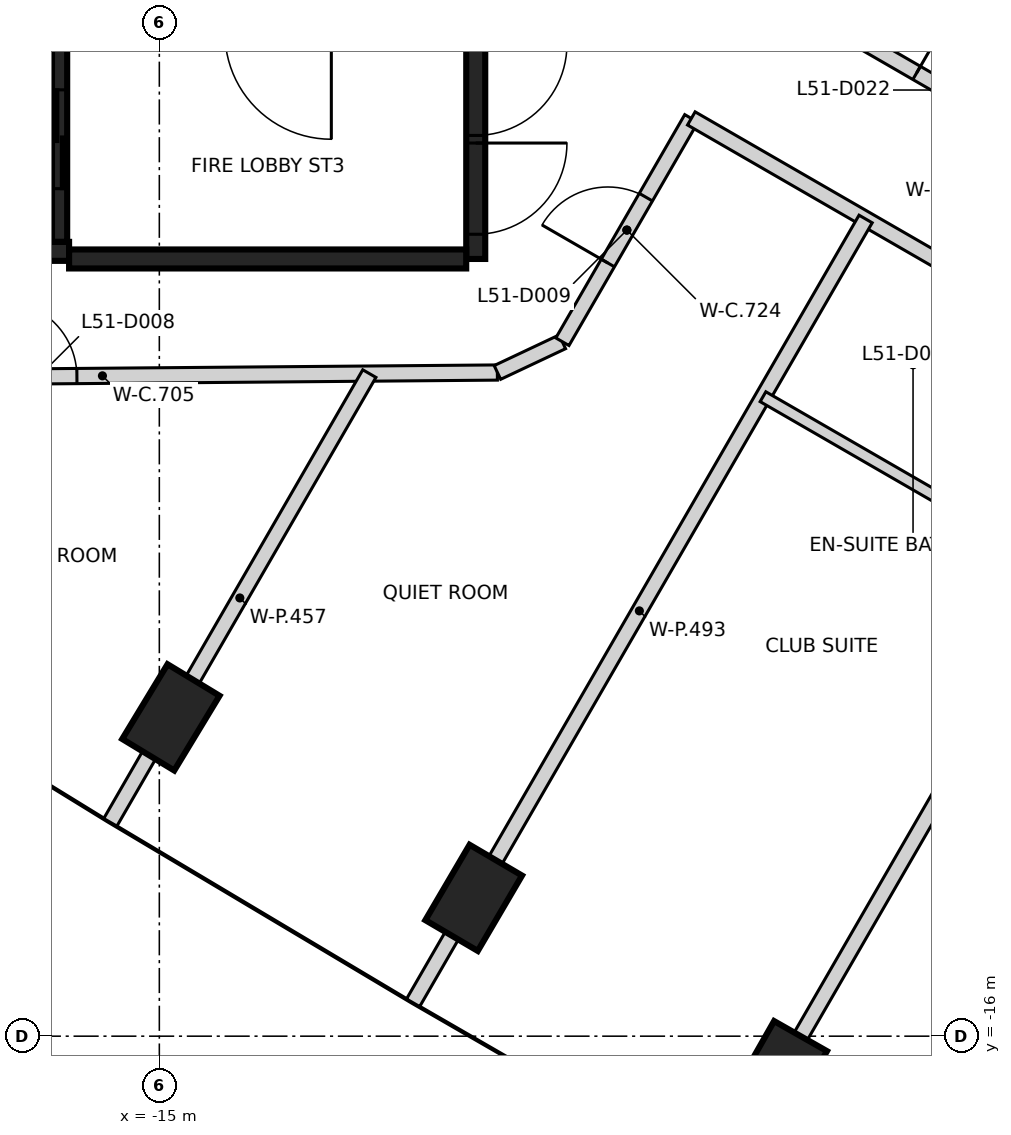
"""IFC4 building model, lengths in metres.
Left out: names, types, materials, properties, quantities, classifications, styles, units other than length and angle.
Written with IfcOpenShell. Run it as: python <this file> out.ifc"""

import sys

from ifc_helpers import new_model, si_unit, direction, frame, frame_2d, origin, origin_2d, place, context, subcontext, project, spatial, rectangle, extrude, element, fill, save


model = new_model("IFC4")
c1 = context("Model", 3, precision=1e-05, world=origin(), true_north=direction((0.0, 1.0)))
c2 = subcontext(c1, "Body", "Model", "MODEL_VIEW")
j1 = project(units=[si_unit("LENGTHUNIT", "METRE"), si_unit("PLANEANGLEUNIT", "RADIAN")], contexts=[c1])
p1 = place(None, origin())
s1 = spatial("IfcSite", under=j1, at=p1, CompositionType="ELEMENT")
p2 = place(p1, origin())
s2 = spatial("IfcBuilding", under=s1, at=p2, CompositionType="ELEMENT")
p3 = place(p2, frame((0.0, 0.0, 204.4)))
s3 = spatial("IfcBuildingStorey", under=s2, at=p3, CompositionType="ELEMENT", Elevation=204.4)
for number, where, z_axis, x_axis in (
    (1, (-14.848, -11.806, -0.35), (0.0, 0.0, 1.0), (0.518, 0.855, 0.0)),
    (2, (-10.864, -14.18, -0.35), (0.0, 0.0, 1.0), (0.506, 0.862, 0.0)),
    (3, (-6.848, -16.499, -0.35), (0.0, 0.0, 1.0), (0.494, 0.87, 0.0)),
):
    element("IfcColumn", number, at=place(p3, frame(where, z_axis=z_axis, x_axis=x_axis)), inside=s3, PredefinedType="COLUMN", context=c2, shape_type="SweptSolid", body=[
        extrude(rectangle(XDim=1.15, YDim=0.8, at=origin_2d()), origin(), (0.0, 0.0, 1.0), 3.6),
    ])
p4 = place(p3, frame((-10.837, 5.775, 0.0), z_axis=(0.0, 0.0, 1.0), x_axis=(0.0, -1.0, 0.0)))
e4 = element("IfcWall", 4, at=p4, inside=s3, PredefinedType="SHEAR", context=c2, shape_type="SweptSolid", body=[
    extrude(rectangle(XDim=11.55, YDim=0.25, at=frame_2d((5.775, 0.0))), origin(), (0.0, 0.0, 1.0), 3.25),
])
p5 = place(p4, frame((10.025, 0.0, 0.0)))
e5 = element("IfcOpeningElement", 5, at=p5, cuts=e4, PredefinedType="OPENING", context=c2, shape_type="SweptSolid", body=[
    extrude(rectangle(XDim=1.2, YDim=2.1, at=frame_2d((0.6, 1.05))), frame((0.0, 0.135, 0.0), z_axis=(0.0, -1.0, 0.0), x_axis=(1.0, 0.0, 0.0)), (0.0, 0.0, 1.0), 0.27),
])
p6 = place(p4, frame((8.725, 0.0, 0.0)))
e6 = element("IfcOpeningElement", 6, at=p6, cuts=e4, PredefinedType="OPENING", context=c2, shape_type="SweptSolid", body=[
    extrude(rectangle(XDim=1.2, YDim=2.1, at=frame_2d((0.6, 1.05))), frame((0.0, 0.135, 0.0), z_axis=(0.0, -1.0, 0.0), x_axis=(1.0, 0.0, 0.0)), (0.0, 0.0, 1.0), 0.27),
])
p7 = place(p3, frame((-16.187, -5.675, 0.0), z_axis=(0.0, 0.0, 1.0), x_axis=(-1.0, 0.0, 0.0)))
e7 = element("IfcWall", 7, at=p7, inside=s3, PredefinedType="SHEAR", context=c2, shape_type="SweptSolid", body=[
    extrude(rectangle(XDim=6.125, YDim=0.25, at=frame_2d((3.062, 0.0))), origin(), (0.0, 0.0, 1.0), 3.25),
])
p8 = place(p7, frame((3.563, 0.0, 0.0)))
e8 = element("IfcOpeningElement", 8, at=p8, cuts=e7, PredefinedType="OPENING", context=c2, shape_type="SweptSolid", body=[
    extrude(rectangle(XDim=1.0, YDim=2.1, at=frame_2d((0.5, 1.05))), frame((0.0, 0.135, 0.0), z_axis=(0.0, -1.0, 0.0), x_axis=(1.0, 0.0, 0.0)), (0.0, 0.0, 1.0), 0.27),
])
p9 = place(p3, frame((-10.963, -5.775, 0.0), z_axis=(0.0, 0.0, 1.0), x_axis=(-1.0, 0.0, 0.0)))
e9 = element("IfcWall", 9, at=p9, inside=s3, PredefinedType="SHEAR", context=c2, shape_type="SweptSolid", body=[
    extrude(rectangle(XDim=5.225, YDim=0.25, at=frame_2d((2.612, 0.0))), origin(), (0.0, 0.0, 1.0), 3.25),
])
p10 = place(p3, frame((-16.312, -2.898, 0.0), z_axis=(0.0, 0.0, 1.0), x_axis=(0.0, -1.0, 0.0)))
e10 = element("IfcWall", 10, at=p10, inside=s3, PredefinedType="SHEAR", context=c2, shape_type="SweptSolid", body=[
    extrude(rectangle(XDim=2.651, YDim=0.2, at=frame_2d((1.325, 0.0))), origin(), (0.0, 0.0, 1.0), 3.25),
])
p11 = place(p10, frame((0.652, 0.0, 0.0)))
e11 = element("IfcOpeningElement", 11, at=p11, cuts=e10, PredefinedType="OPENING", context=c2, shape_type="SweptSolid", body=[
    extrude(rectangle(XDim=1.3, YDim=2.1, at=frame_2d((0.65, 1.05))), frame((0.0, 0.11, 0.0), z_axis=(0.0, -1.0, 0.0), x_axis=(1.0, 0.0, 0.0)), (0.0, 0.0, 1.0), 0.22),
])
p12 = place(p3, frame((-20.944, -7.356, 0.0), z_axis=(0.0, 0.0, 1.0), x_axis=(0.999965021341, 0.008363976025, 0.0)))
e12 = element("IfcWall", 12, at=p12, inside=s3, PredefinedType="PARTITIONING", context=c2, shape_type="SweptSolid", body=[
    extrude(rectangle(XDim=10.391, YDim=0.2, at=frame_2d((5.196, 0.0))), origin(), (0.0, 0.0, 1.0), 3.25),
])
p13 = place(p12, frame((3.86, 0.0, 0.0)))
e13 = element("IfcOpeningElement", 13, at=p13, cuts=e12, PredefinedType="OPENING", context=c2, shape_type="SweptSolid", body=[
    extrude(rectangle(XDim=1.0, YDim=2.1, at=frame_2d((0.5, 1.05))), frame((0.0, 0.11, 0.0), z_axis=(0.0, -1.0, 0.0), x_axis=(1.0, 0.0, 0.0)), (0.0, 0.0, 1.0), 0.22),
])
p14 = place(p3, frame((-10.552, -7.268, 0.0), z_axis=(0.0, 0.0, 1.0), x_axis=(0.904331815333, 0.426830139255, 0.0)))
e14 = element("IfcWall", 14, at=p14, inside=s3, PredefinedType="PARTITIONING", context=c2, shape_type="SweptSolid", body=[
    extrude(rectangle(XDim=0.944, YDim=0.2, at=frame_2d((0.472, 0.0))), origin(), (0.0, 0.0, 1.0), 3.25),
])
p15 = place(p3, frame((-9.697, -6.864, 0.0), z_axis=(0.0, 0.0, 1.0), x_axis=(0.499955030392, 0.866051365443, 0.0)))
e15 = element("IfcWall", 15, at=p15, inside=s3, PredefinedType="PARTITIONING", context=c2, shape_type="SweptSolid", body=[
    extrude(rectangle(XDim=3.392, YDim=0.2, at=frame_2d((1.696, 0.0))), origin(), (0.0, 0.0, 1.0), 3.25),
])
p16 = place(p15, frame((1.196, 0.0, 0.0)))
e16 = element("IfcOpeningElement", 16, at=p16, cuts=e15, PredefinedType="OPENING", context=c2, shape_type="SweptSolid", body=[
    extrude(rectangle(XDim=1.0, YDim=2.1, at=frame_2d((0.5, 1.05))), frame((0.0, 0.11, 0.0), z_axis=(0.0, -1.0, 0.0), x_axis=(1.0, 0.0, 0.0)), (0.0, 0.0, 1.0), 0.22),
])
p17 = place(p3, frame((-8.612, -1.263, 0.0), z_axis=(0.0, 0.0, 1.0), x_axis=(0.865996442381, -0.500050159267, 0.0)))
e17 = element("IfcWall", 17, at=p17, inside=s3, PredefinedType="PARTITIONING", context=c2, shape_type="SweptSolid", body=[
    extrude(rectangle(XDim=9.157, YDim=0.2, at=frame_2d((4.579, 0.0))), origin(), (0.0, 0.0, 1.0), 3.25),
])
p18 = place(p17, frame((4.128, 0.0, 0.0)))
e18 = element("IfcOpeningElement", 18, at=p18, cuts=e17, PredefinedType="OPENING", context=c2, shape_type="SweptSolid", body=[
    extrude(rectangle(XDim=0.9, YDim=2.1, at=frame_2d((0.45, 1.05))), frame((0.0, 0.11, 0.0), z_axis=(0.0, -1.0, 0.0), x_axis=(1.0, 0.0, 0.0)), (0.0, 0.0, 1.0), 0.22),
])
p19 = place(p3, frame((-8.001, -3.926, 0.0), z_axis=(0.0, 0.0, 1.0), x_axis=(0.866131158271, -0.499816783104, 0.0)))
e19 = element("IfcWall", 19, at=p19, inside=s3, PredefinedType="PARTITIONING", context=c2, shape_type="SweptSolid", body=[
    extrude(rectangle(XDim=12.995, YDim=0.2, at=frame_2d((6.498, 0.0))), origin(), (0.0, 0.0, 1.0), 3.25),
])
p20 = place(p19, frame((6.146, 0.0, 0.0)))
e20 = element("IfcOpeningElement", 20, at=p20, cuts=e19, PredefinedType="OPENING", context=c2, shape_type="SweptSolid", body=[
    extrude(rectangle(XDim=0.95, YDim=2.1, at=frame_2d((0.475, 1.05))), frame((0.0, 0.11, 0.0), z_axis=(0.0, -1.0, 0.0), x_axis=(1.0, 0.0, 0.0)), (0.0, 0.0, 1.0), 0.22),
])
p21 = place(p19, frame((10.472, 0.0, 0.0)))
e21 = element("IfcOpeningElement", 21, at=p21, cuts=e19, PredefinedType="OPENING", context=c2, shape_type="SweptSolid", body=[
    extrude(rectangle(XDim=0.95, YDim=2.1, at=frame_2d((0.475, 1.05))), frame((0.0, 0.11, 0.0), z_axis=(0.0, -1.0, 0.0), x_axis=(1.0, 0.0, 0.0)), (0.0, 0.0, 1.0), 0.22),
])
p22 = place(p3, frame((-15.645, -13.187, 0.0), z_axis=(0.0, 0.0, 1.0), x_axis=(0.499921913572, 0.866070482311, 0.0)))
e22 = element("IfcWall", 22, at=p22, inside=s3, PredefinedType="PARTITIONING", context=c2, shape_type="SweptSolid", body=[
    extrude(rectangle(XDim=6.816, YDim=0.2, at=frame_2d((3.408, 0.0))), origin(), (0.0, 0.0, 1.0), 3.25),
])
p23 = place(p3, frame((-11.661, -15.561, 0.0), z_axis=(0.0, 0.0, 1.0), x_axis=(0.500000523332, 0.866025101638, 0.0)))
e23 = element("IfcWall", 23, at=p23, inside=s3, PredefinedType="PARTITIONING", context=c2, shape_type="SweptSolid", body=[
    extrude(rectangle(XDim=11.907, YDim=0.2, at=frame_2d((5.953, 0.0))), origin(), (0.0, 0.0, 1.0), 3.25),
])
p24 = place(p3, frame((-7.6, -0.924, 0.0), z_axis=(0.0, 0.0, 1.0), x_axis=(0.866038843867, -0.499976720371, 0.0)))
e24 = element("IfcWall", 24, at=p24, inside=s3, PredefinedType="PARTITIONING", context=c2, shape_type="SweptSolid", body=[
    extrude(rectangle(XDim=8.45, YDim=0.2, at=frame_2d((4.225, 0.0))), origin(), (0.0, 0.0, 1.0), 3.25),
])
p25 = place(p3, frame((-7.646, -17.879, 0.0), z_axis=(0.0, 0.0, 1.0), x_axis=(0.500042538917, 0.866000842536, 0.0)))
e25 = element("IfcWall", 25, at=p25, inside=s3, PredefinedType="PARTITIONING", context=c2, shape_type="SweptSolid", body=[
    extrude(rectangle(XDim=11.906, YDim=0.2, at=frame_2d((5.953, 0.0))), origin(), (0.0, 0.0, 1.0), 3.25),
])
p26 = place(p3, frame((-7.058, -7.587, 0.0), z_axis=(0.0, 0.0, 1.0), x_axis=(0.866031096941, -0.499990139034, 0.0)))
e26 = element("IfcWall", 26, at=p26, inside=s3, PredefinedType="PARTITIONING", context=c2, shape_type="SweptSolid", body=[
    extrude(rectangle(XDim=3.0, YDim=0.15, at=frame_2d((1.5, 0.0))), origin(), (0.0, 0.0, 1.0), 3.25),
])
p27 = place(p11, origin())
e27 = element("IfcDoor", 27, at=p27, inside=s3, OperationType="SLIDING_TO_LEFT", PredefinedType="DOOR", context=c2, shape_type="SweptSolid", body=[
    extrude(rectangle(XDim=1.3, YDim=2.1, at=frame_2d((0.65, 1.05))), frame((0.0, 0.025, 0.0), z_axis=(0.0, -1.0, 0.0), x_axis=(1.0, 0.0, 0.0)), (0.0, 0.0, 1.0), 0.05),
])
fill(e11, e27)
p28 = place(p5, origin())
e28 = element("IfcDoor", 28, at=p28, inside=s3, OperationType="SINGLE_SWING_LEFT", PredefinedType="DOOR", context=c2, shape_type="SweptSolid", body=[
    extrude(rectangle(XDim=1.2, YDim=2.1, at=frame_2d((0.6, 1.05))), frame((0.0, 0.025, 0.0), z_axis=(0.0, -1.0, 0.0), x_axis=(1.0, 0.0, 0.0)), (0.0, 0.0, 1.0), 0.05),
])
fill(e5, e28)
p29 = place(p6, origin())
e29 = element("IfcDoor", 29, at=p29, inside=s3, OperationType="SINGLE_SWING_RIGHT", PredefinedType="DOOR", context=c2, shape_type="SweptSolid", body=[
    extrude(rectangle(XDim=1.2, YDim=2.1, at=frame_2d((0.6, 1.05))), frame((0.0, 0.025, 0.0), z_axis=(0.0, -1.0, 0.0), x_axis=(1.0, 0.0, 0.0)), (0.0, 0.0, 1.0), 0.05),
])
fill(e6, e29)
p30 = place(p13, frame((1.0, 0.0, 0.0), z_axis=(0.0, 0.0, 1.0), x_axis=(-1.0, 0.0, 0.0)))
e30 = element("IfcDoor", 30, at=p30, inside=s3, OperationType="SINGLE_SWING_LEFT", PredefinedType="DOOR", context=c2, shape_type="SweptSolid", body=[
    extrude(rectangle(XDim=1.0, YDim=2.1, at=frame_2d((0.5, 1.05))), frame((0.0, 0.025, 0.0), z_axis=(0.0, -1.0, 0.0), x_axis=(1.0, 0.0, 0.0)), (0.0, 0.0, 1.0), 0.05),
])
fill(e13, e30)
p31 = place(p16, frame((1.0, 0.0, 0.0), z_axis=(0.0, 0.0, 1.0), x_axis=(-1.0, 0.0, 0.0)))
e31 = element("IfcDoor", 31, at=p31, inside=s3, OperationType="SINGLE_SWING_LEFT", PredefinedType="DOOR", context=c2, shape_type="SweptSolid", body=[
    extrude(rectangle(XDim=1.0, YDim=2.1, at=frame_2d((0.5, 1.05))), frame((0.0, 0.025, 0.0), z_axis=(0.0, -1.0, 0.0), x_axis=(1.0, 0.0, 0.0)), (0.0, 0.0, 1.0), 0.05),
])
fill(e16, e31)
p32 = place(p18, origin())
e32 = element("IfcDoor", 32, at=p32, inside=s3, OperationType="SINGLE_SWING_LEFT", PredefinedType="DOOR", context=c2, shape_type="SweptSolid", body=[
    extrude(rectangle(XDim=0.9, YDim=2.1, at=frame_2d((0.45, 1.05))), frame((0.0, 0.025, 0.0), z_axis=(0.0, -1.0, 0.0), x_axis=(1.0, 0.0, 0.0)), (0.0, 0.0, 1.0), 0.05),
])
fill(e18, e32)
save(model, sys.argv[1])
